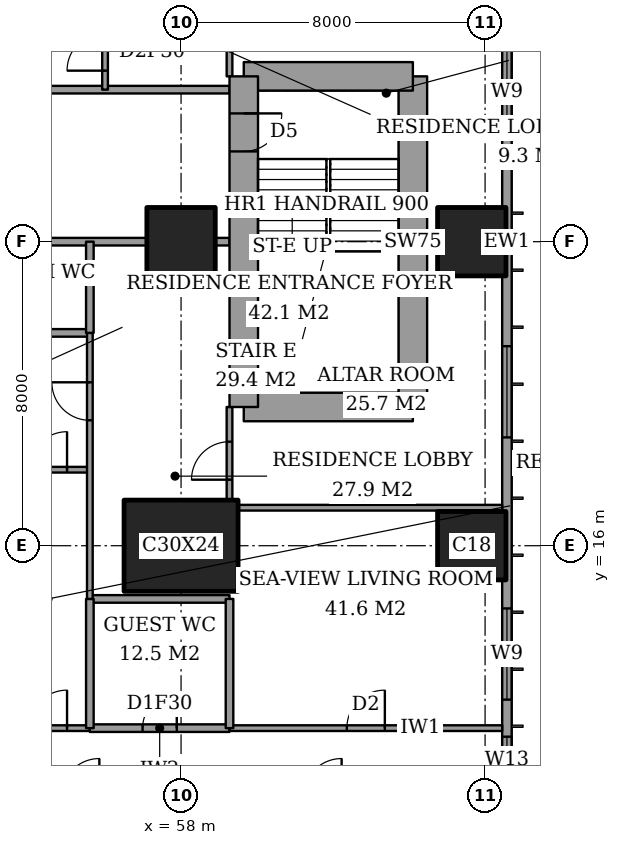
"""IFC4 building model, lengths in metres.
Left out: names, types, materials, properties, quantities, classifications, styles, units other than length and angle.
Written with IfcOpenShell. Run it as: python <this file> out.ifc"""

import sys

from ifc_helpers import new_model, si_unit, direction, frame, frame_2d, origin, origin_2d, place, context, subcontext, project, spatial, rectangle, extrude, element, fill, save


model = new_model("IFC4")
c1 = context("Model", 3, precision=1e-05, world=origin(), true_north=direction((0.0, 1.0)))
c2 = subcontext(c1, "Body", "Model", "MODEL_VIEW")
j1 = project(units=[si_unit("LENGTHUNIT", "METRE"), si_unit("PLANEANGLEUNIT", "RADIAN")], contexts=[c1])
p1 = place(None, origin())
s1 = spatial("IfcSite", under=j1, at=p1, CompositionType="ELEMENT")
p2 = place(p1, origin())
s2 = spatial("IfcBuilding", under=s1, at=p2, CompositionType="ELEMENT")
p3 = place(p2, frame((0.0, 0.0, 189.4)))
s3 = spatial("IfcBuildingStorey", under=s2, at=p3, CompositionType="ELEMENT", Elevation=189.4)
p4 = place(p3, frame((58.0, 16.0, 0.0), z_axis=(0.0, 0.0, 1.0), x_axis=(1.0, 0.0, 0.0)))
e1 = element("IfcColumn", 1, at=p4, inside=s3, PredefinedType="COLUMN", context=c2, shape_type="SweptSolid", body=[
    extrude(rectangle(XDim=3.0, YDim=2.4, at=origin_2d()), origin(), (0.0, 0.0, 1.0), 3.6),
])
for number, where, z_axis, x_axis in (
    (2, (58.0, 24.0, 0.0), (0.0, 0.0, 1.0), (1.0, 0.0, 0.0)),
    (3, (65.65, 16.0, 0.0), (0.0, 0.0, 1.0), (1.0, 0.0, 0.0)),
    (4, (65.65, 24.0, 0.0), (0.0, 0.0, 1.0), (1.0, 0.0, 0.0)),
):
    element("IfcColumn", number, at=place(p3, frame(where, z_axis=z_axis, x_axis=x_axis)), inside=s3, PredefinedType="COLUMN", context=c2, shape_type="SweptSolid", body=[
        extrude(rectangle(XDim=1.8, YDim=1.8, at=origin_2d()), origin(), (0.0, 0.0, 1.0), 3.6),
    ])
p5 = place(p3, frame((59.65, 19.65, 0.0), z_axis=(0.0, 0.0, 1.0), x_axis=(1.0, 0.0, 0.0)))
e5 = element("IfcWall", 5, at=p5, inside=s3, PredefinedType="SHEAR", context=c2, shape_type="SweptSolid", body=[
    extrude(rectangle(XDim=4.45, YDim=0.75, at=frame_2d((2.225, 0.0))), origin(), (0.0, 0.0, 1.0), 3.6),
])
p6 = place(p3, frame((64.1, 19.65, 0.0), z_axis=(0.0, 0.0, 1.0), x_axis=(0.0, 1.0, 0.0)))
e6 = element("IfcWall", 6, at=p6, inside=s3, PredefinedType="SHEAR", context=c2, shape_type="SweptSolid", body=[
    extrude(rectangle(XDim=8.7, YDim=0.75, at=frame_2d((4.35, 0.0))), origin(), (0.0, 0.0, 1.0), 3.6),
])
p7 = place(p3, frame((64.1, 28.35, 0.0), z_axis=(0.0, 0.0, 1.0), x_axis=(-1.0, 0.0, 0.0)))
e7 = element("IfcWall", 7, at=p7, inside=s3, PredefinedType="SHEAR", context=c2, shape_type="SweptSolid", body=[
    extrude(rectangle(XDim=4.45, YDim=0.75, at=frame_2d((2.225, 0.0))), origin(), (0.0, 0.0, 1.0), 3.6),
])
p8 = place(p3, frame((59.65, 28.35, 0.0), z_axis=(0.0, 0.0, 1.0), x_axis=(0.0, -1.0, 0.0)))
e8 = element("IfcWall", 8, at=p8, inside=s3, PredefinedType="SHEAR", context=c2, shape_type="SweptSolid", body=[
    extrude(rectangle(XDim=8.7, YDim=0.75, at=frame_2d((4.35, 0.0))), origin(), (0.0, 0.0, 1.0), 3.6),
])
p9 = place(p8, frame((0.975, 0.0, 0.0)))
e9 = element("IfcOpeningElement", 9, at=p9, cuts=e8, PredefinedType="OPENING", context=c2, shape_type="SweptSolid", body=[
    extrude(rectangle(XDim=1.0, YDim=2.1, at=frame_2d((0.5, 1.05))), frame((0.0, 0.385, 0.0), z_axis=(0.0, -1.0, 0.0), x_axis=(1.0, 0.0, 0.0)), (0.0, 0.0, 1.0), 0.77),
])
p10 = place(p3, frame((66.575, 3.175, 0.0), z_axis=(0.0, 0.0, 1.0), x_axis=(0.0, 1.0, 0.0)))
e10 = element("IfcWall", 10, at=p10, inside=s3, PredefinedType="SOLIDWALL", context=c2, shape_type="SweptSolid", body=[
    extrude(rectangle(XDim=41.65, YDim=0.25, at=frame_2d((20.825, 0.0))), origin(), (0.0, 0.0, 1.0), 3.6),
])
p11 = place(p10, frame((0.825, 0.0, 0.2)))
e11 = element("IfcOpeningElement", 11, at=p11, cuts=e10, PredefinedType="OPENING", context=c2, shape_type="SweptSolid", body=[
    extrude(rectangle(XDim=2.4, YDim=2.4, at=frame_2d((1.2, 1.2))), frame((0.0, 0.135, 0.0), z_axis=(0.0, -1.0, 0.0), x_axis=(1.0, 0.0, 0.0)), (0.0, 0.0, 1.0), 0.27),
])
p12 = place(p10, frame((6.6, 0.0, 0.2)))
e12 = element("IfcOpeningElement", 12, at=p12, cuts=e10, PredefinedType="OPENING", context=c2, shape_type="SweptSolid", body=[
    extrude(rectangle(XDim=1.2, YDim=2.4, at=frame_2d((0.6, 1.2))), frame((0.0, 0.135, 0.0), z_axis=(0.0, -1.0, 0.0), x_axis=(1.0, 0.0, 0.0)), (0.0, 0.0, 1.0), 0.27),
])
p13 = place(p10, frame((8.775, 0.0, 0.2)))
e13 = element("IfcOpeningElement", 13, at=p13, cuts=e10, PredefinedType="OPENING", context=c2, shape_type="SweptSolid", body=[
    extrude(rectangle(XDim=2.4, YDim=2.4, at=frame_2d((1.2, 1.2))), frame((0.0, 0.135, 0.0), z_axis=(0.0, -1.0, 0.0), x_axis=(1.0, 0.0, 0.0)), (0.0, 0.0, 1.0), 0.27),
])
p14 = place(p10, frame((15.675, 0.0, 0.2)))
e14 = element("IfcOpeningElement", 14, at=p14, cuts=e10, PredefinedType="OPENING", context=c2, shape_type="SweptSolid", body=[
    extrude(rectangle(XDim=2.4, YDim=2.4, at=frame_2d((1.2, 1.2))), frame((0.0, 0.135, 0.0), z_axis=(0.0, -1.0, 0.0), x_axis=(1.0, 0.0, 0.0)), (0.0, 0.0, 1.0), 0.27),
])
p15 = place(p10, frame((23.575, 0.0, 0.2)))
e15 = element("IfcOpeningElement", 15, at=p15, cuts=e10, PredefinedType="OPENING", context=c2, shape_type="SweptSolid", body=[
    extrude(rectangle(XDim=2.4, YDim=2.4, at=frame_2d((1.2, 1.2))), frame((0.0, 0.135, 0.0), z_axis=(0.0, -1.0, 0.0), x_axis=(1.0, 0.0, 0.0)), (0.0, 0.0, 1.0), 0.27),
])
p16 = place(p10, frame((30.775, 0.0, 0.2)))
e16 = element("IfcOpeningElement", 16, at=p16, cuts=e10, PredefinedType="OPENING", context=c2, shape_type="SweptSolid", body=[
    extrude(rectangle(XDim=2.4, YDim=2.4, at=frame_2d((1.2, 1.2))), frame((0.0, 0.135, 0.0), z_axis=(0.0, -1.0, 0.0), x_axis=(1.0, 0.0, 0.0)), (0.0, 0.0, 1.0), 0.27),
])
p17 = place(p10, frame((34.55, 0.0, 0.2)))
e17 = element("IfcOpeningElement", 17, at=p17, cuts=e10, PredefinedType="OPENING", context=c2, shape_type="SweptSolid", body=[
    extrude(rectangle(XDim=1.2, YDim=2.4, at=frame_2d((0.6, 1.2))), frame((0.0, 0.135, 0.0), z_axis=(0.0, -1.0, 0.0), x_axis=(1.0, 0.0, 0.0)), (0.0, 0.0, 1.0), 0.27),
])
p18 = place(p10, frame((38.425, 0.0, 0.2)))
e18 = element("IfcOpeningElement", 18, at=p18, cuts=e10, PredefinedType="OPENING", context=c2, shape_type="SweptSolid", body=[
    extrude(rectangle(XDim=2.4, YDim=2.4, at=frame_2d((1.2, 1.2))), frame((0.0, 0.135, 0.0), z_axis=(0.0, -1.0, 0.0), x_axis=(1.0, 0.0, 0.0)), (0.0, 0.0, 1.0), 0.27),
])
p19 = place(p3, frame((55.6, 11.2, 0.0), z_axis=(0.0, 0.0, 1.0), x_axis=(1.0, 0.0, 0.0)))
e19 = element("IfcWall", 19, at=p19, inside=s3, PredefinedType="PARTITIONING", context=c2, shape_type="SweptSolid", body=[
    extrude(rectangle(XDim=3.675, YDim=0.2, at=frame_2d((1.837, 0.0))), origin(), (0.0, 0.0, 1.0), 3.35),
])
p20 = place(p19, frame((1.387, 0.0, 0.0)))
e20 = element("IfcOpeningElement", 20, at=p20, cuts=e19, PredefinedType="OPENING", context=c2, shape_type="SweptSolid", body=[
    extrude(rectangle(XDim=0.9, YDim=2.1, at=frame_2d((0.45, 1.05))), frame((0.0, 0.11, 0.0), z_axis=(0.0, -1.0, 0.0), x_axis=(1.0, 0.0, 0.0)), (0.0, 0.0, 1.0), 0.22),
])
p21 = place(p3, frame((41.439, 11.2, 0.0), z_axis=(0.0, 0.0, 1.0), x_axis=(1.0, 0.0, 0.0)))
e21 = element("IfcWall", 21, at=p21, inside=s3, PredefinedType="PARTITIONING", context=c2, shape_type="SweptSolid", body=[
    extrude(rectangle(XDim=14.161, YDim=0.15, at=frame_2d((7.081, 0.0))), origin(), (0.0, 0.0, 1.0), 3.35),
])
p22 = place(p21, frame((12.561, 0.0, 0.0)))
e22 = element("IfcOpeningElement", 22, at=p22, cuts=e21, PredefinedType="OPENING", context=c2, shape_type="SweptSolid", body=[
    extrude(rectangle(XDim=1.0, YDim=2.1, at=frame_2d((0.5, 1.05))), frame((0.0, 0.085, 0.0), z_axis=(0.0, -1.0, 0.0), x_axis=(1.0, 0.0, 0.0)), (0.0, 0.0, 1.0), 0.17),
])
p23 = place(p21, frame((10.061, 0.0, 0.0)))
e23 = element("IfcOpeningElement", 23, at=p23, cuts=e21, PredefinedType="OPENING", context=c2, shape_type="SweptSolid", body=[
    extrude(rectangle(XDim=1.0, YDim=2.1, at=frame_2d((0.5, 1.05))), frame((0.0, 0.085, 0.0), z_axis=(0.0, -1.0, 0.0), x_axis=(1.0, 0.0, 0.0)), (0.0, 0.0, 1.0), 0.17),
])
p24 = place(p21, frame((7.361, 0.0, 0.0)))
e24 = element("IfcOpeningElement", 24, at=p24, cuts=e21, PredefinedType="OPENING", context=c2, shape_type="SweptSolid", body=[
    extrude(rectangle(XDim=1.0, YDim=2.1, at=frame_2d((0.5, 1.05))), frame((0.0, 0.085, 0.0), z_axis=(0.0, -1.0, 0.0), x_axis=(1.0, 0.0, 0.0)), (0.0, 0.0, 1.0), 0.17),
])
p25 = place(p21, frame((2.836, 0.0, 0.0)))
e25 = element("IfcOpeningElement", 25, at=p25, cuts=e21, PredefinedType="OPENING", context=c2, shape_type="SweptSolid", body=[
    extrude(rectangle(XDim=1.0, YDim=2.1, at=frame_2d((0.5, 1.05))), frame((0.0, 0.085, 0.0), z_axis=(0.0, -1.0, 0.0), x_axis=(1.0, 0.0, 0.0)), (0.0, 0.0, 1.0), 0.17),
])
p26 = place(p3, frame((59.275, 11.2, 0.0), z_axis=(0.0, 0.0, 1.0), x_axis=(1.0, 0.0, 0.0)))
e26 = element("IfcWall", 26, at=p26, inside=s3, PredefinedType="PARTITIONING", context=c2, shape_type="SweptSolid", body=[
    extrude(rectangle(XDim=7.175, YDim=0.15, at=frame_2d((3.587, 0.0))), origin(), (0.0, 0.0, 1.0), 3.35),
])
p27 = place(p26, frame((3.087, 0.0, 0.0)))
e27 = element("IfcOpeningElement", 27, at=p27, cuts=e26, PredefinedType="OPENING", context=c2, shape_type="SweptSolid", body=[
    extrude(rectangle(XDim=1.0, YDim=2.1, at=frame_2d((0.5, 1.05))), frame((0.0, 0.085, 0.0), z_axis=(0.0, -1.0, 0.0), x_axis=(1.0, 0.0, 0.0)), (0.0, 0.0, 1.0), 0.17),
])
p28 = place(p3, frame((55.6, 14.6, 0.0), z_axis=(0.0, 0.0, 1.0), x_axis=(1.0, 0.0, 0.0)))
e28 = element("IfcWall", 28, at=p28, inside=s3, PredefinedType="PARTITIONING", context=c2, shape_type="SweptSolid", body=[
    extrude(rectangle(XDim=3.675, YDim=0.2, at=frame_2d((1.837, 0.0))), origin(), (0.0, 0.0, 1.0), 3.35),
])
p29 = place(p3, frame((59.5, 17.0, 0.0), z_axis=(0.0, 0.0, 1.0), x_axis=(1.0, 0.0, 0.0)))
e29 = element("IfcWall", 29, at=p29, inside=s3, PredefinedType="PARTITIONING", context=c2, shape_type="SweptSolid", body=[
    extrude(rectangle(XDim=6.95, YDim=0.15, at=frame_2d((3.475, 0.0))), origin(), (0.0, 0.0, 1.0), 3.35),
])
p30 = place(p3, frame((51.6, 18.0, 0.0), z_axis=(0.0, 0.0, 1.0), x_axis=(1.0, 0.0, 0.0)))
e30 = element("IfcWall", 30, at=p30, inside=s3, PredefinedType="PARTITIONING", context=c2, shape_type="SweptSolid", body=[
    extrude(rectangle(XDim=4.0, YDim=0.15, at=frame_2d((2.0, 0.0))), origin(), (0.0, 0.0, 1.0), 3.35),
])
p31 = place(p30, frame((2.4, 0.0, 0.0)))
e31 = element("IfcOpeningElement", 31, at=p31, cuts=e30, PredefinedType="OPENING", context=c2, shape_type="SweptSolid", body=[
    extrude(rectangle(XDim=1.0, YDim=2.1, at=frame_2d((0.5, 1.05))), frame((0.0, 0.085, 0.0), z_axis=(0.0, -1.0, 0.0), x_axis=(1.0, 0.0, 0.0)), (0.0, 0.0, 1.0), 0.17),
])
p32 = place(p3, frame((51.2, 21.6, 0.0), z_axis=(0.0, 0.0, 1.0), x_axis=(1.0, 0.0, 0.0)))
e32 = element("IfcWall", 32, at=p32, inside=s3, PredefinedType="PARTITIONING", context=c2, shape_type="SweptSolid", body=[
    extrude(rectangle(XDim=4.4, YDim=0.2, at=frame_2d((2.2, 0.0))), origin(), (0.0, 0.0, 1.0), 3.35),
])
p33 = place(p32, frame((1.75, 0.0, 0.0)))
e33 = element("IfcOpeningElement", 33, at=p33, cuts=e32, PredefinedType="OPENING", context=c2, shape_type="SweptSolid", body=[
    extrude(rectangle(XDim=0.9, YDim=2.1, at=frame_2d((0.45, 1.05))), frame((0.0, 0.11, 0.0), z_axis=(0.0, -1.0, 0.0), x_axis=(1.0, 0.0, 0.0)), (0.0, 0.0, 1.0), 0.22),
])
p34 = place(p3, frame((50.9, 24.0, 0.0), z_axis=(0.0, 0.0, 1.0), x_axis=(1.0, 0.0, 0.0)))
e34 = element("IfcWall", 34, at=p34, inside=s3, PredefinedType="PARTITIONING", context=c2, shape_type="SweptSolid", body=[
    extrude(rectangle(XDim=6.2, YDim=0.2, at=frame_2d((3.1, 0.0))), origin(), (0.0, 0.0, 1.0), 3.35),
])
p35 = place(p3, frame((58.9, 24.0, 0.0), z_axis=(0.0, 0.0, 1.0), x_axis=(1.0, 0.0, 0.0)))
e35 = element("IfcWall", 35, at=p35, inside=s3, PredefinedType="PARTITIONING", context=c2, shape_type="SweptSolid", body=[
    extrude(rectangle(XDim=0.375, YDim=0.2, at=frame_2d((0.188, 0.0))), origin(), (0.0, 0.0, 1.0), 3.35),
])
p36 = place(p3, frame((42.0, 28.0, 0.0), z_axis=(0.0, 0.0, 1.0), x_axis=(1.0, 0.0, 0.0)))
e36 = element("IfcWall", 36, at=p36, inside=s3, PredefinedType="PARTITIONING", context=c2, shape_type="SweptSolid", body=[
    extrude(rectangle(XDim=17.275, YDim=0.2, at=frame_2d((8.637, 0.0))), origin(), (0.0, 0.0, 1.0), 3.35),
])
p37 = place(p36, frame((9.4, 0.0, 0.0)))
e37 = element("IfcOpeningElement", 37, at=p37, cuts=e36, PredefinedType="OPENING", context=c2, shape_type="SweptSolid", body=[
    extrude(rectangle(XDim=1.2, YDim=2.4, at=frame_2d((0.6, 1.2))), frame((0.0, 0.11, 0.0), z_axis=(0.0, -1.0, 0.0), x_axis=(1.0, 0.0, 0.0)), (0.0, 0.0, 1.0), 0.22),
])
p38 = place(p3, frame((55.6, 11.2, 0.0), z_axis=(0.0, 0.0, 1.0), x_axis=(0.0, 1.0, 0.0)))
e38 = element("IfcWall", 38, at=p38, inside=s3, PredefinedType="PARTITIONING", context=c2, shape_type="SweptSolid", body=[
    extrude(rectangle(XDim=3.4, YDim=0.2, at=frame_2d((1.7, 0.0))), origin(), (0.0, 0.0, 1.0), 3.35),
])
p39 = place(p3, frame((55.6, 21.6, 0.0), z_axis=(0.0, 0.0, 1.0), x_axis=(0.0, 1.0, 0.0)))
e39 = element("IfcWall", 39, at=p39, inside=s3, PredefinedType="PARTITIONING", context=c2, shape_type="SweptSolid", body=[
    extrude(rectangle(XDim=2.4, YDim=0.2, at=frame_2d((1.2, 0.0))), origin(), (0.0, 0.0, 1.0), 3.35),
])
p40 = place(p3, frame((55.6, 14.6, 0.0), z_axis=(0.0, 0.0, 1.0), x_axis=(0.0, 1.0, 0.0)))
e40 = element("IfcWall", 40, at=p40, inside=s3, PredefinedType="PARTITIONING", context=c2, shape_type="SweptSolid", body=[
    extrude(rectangle(XDim=7.0, YDim=0.15, at=frame_2d((3.5, 0.0))), origin(), (0.0, 0.0, 1.0), 3.35),
])
p41 = place(p40, frame((4.7, 0.0, 0.0)))
e41 = element("IfcOpeningElement", 41, at=p41, cuts=e40, PredefinedType="OPENING", context=c2, shape_type="SweptSolid", body=[
    extrude(rectangle(XDim=1.0, YDim=2.1, at=frame_2d((0.5, 1.05))), frame((0.0, 0.085, 0.0), z_axis=(0.0, -1.0, 0.0), x_axis=(1.0, 0.0, 0.0)), (0.0, 0.0, 1.0), 0.17),
])
p42 = place(p3, frame((56.0, 28.0, 0.0), z_axis=(0.0, 0.0, 1.0), x_axis=(0.0, 1.0, 0.0)))
e42 = element("IfcWall", 42, at=p42, inside=s3, PredefinedType="PARTITIONING", context=c2, shape_type="SweptSolid", body=[
    extrude(rectangle(XDim=9.4, YDim=0.15, at=frame_2d((4.7, 0.0))), origin(), (0.0, 0.0, 1.0), 3.35),
])
p43 = place(p42, frame((0.5, 0.0, 0.0)))
e43 = element("IfcOpeningElement", 43, at=p43, cuts=e42, PredefinedType="OPENING", context=c2, shape_type="SweptSolid", body=[
    extrude(rectangle(XDim=1.0, YDim=2.1, at=frame_2d((0.5, 1.05))), frame((0.0, 0.085, 0.0), z_axis=(0.0, -1.0, 0.0), x_axis=(1.0, 0.0, 0.0)), (0.0, 0.0, 1.0), 0.17),
])
p44 = place(p3, frame((59.275, 11.2, 0.0), z_axis=(0.0, 0.0, 1.0), x_axis=(0.0, 1.0, 0.0)))
e44 = element("IfcWall", 44, at=p44, inside=s3, PredefinedType="PARTITIONING", context=c2, shape_type="SweptSolid", body=[
    extrude(rectangle(XDim=3.4, YDim=0.2, at=frame_2d((1.7, 0.0))), origin(), (0.0, 0.0, 1.0), 3.35),
])
p45 = place(p3, frame((59.275, 17.2, 0.0), z_axis=(0.0, 0.0, 1.0), x_axis=(0.0, 1.0, 0.0)))
e45 = element("IfcWall", 45, at=p45, inside=s3, PredefinedType="PARTITIONING", context=c2, shape_type="SweptSolid", body=[
    extrude(rectangle(XDim=2.45, YDim=0.15, at=frame_2d((1.225, 0.0))), origin(), (0.0, 0.0, 1.0), 3.35),
])
p46 = place(p45, frame((0.538, 0.0, 0.0)))
e46 = element("IfcOpeningElement", 46, at=p46, cuts=e45, PredefinedType="OPENING", context=c2, shape_type="SweptSolid", body=[
    extrude(rectangle(XDim=1.0, YDim=2.1, at=frame_2d((0.5, 1.05))), frame((0.0, 0.085, 0.0), z_axis=(0.0, -1.0, 0.0), x_axis=(1.0, 0.0, 0.0)), (0.0, 0.0, 1.0), 0.17),
])
p47 = place(p3, frame((59.275, 28.35, 0.0), z_axis=(0.0, 0.0, 1.0), x_axis=(0.0, 1.0, 0.0)))
e47 = element("IfcWall", 47, at=p47, inside=s3, PredefinedType="PARTITIONING", context=c2, shape_type="SweptSolid", body=[
    extrude(rectangle(XDim=2.45, YDim=0.15, at=frame_2d((1.225, 0.0))), origin(), (0.0, 0.0, 1.0), 3.35),
])
p48 = place(p47, frame((0.962, 0.0, 0.0)))
e48 = element("IfcOpeningElement", 48, at=p48, cuts=e47, PredefinedType="OPENING", context=c2, shape_type="SweptSolid", body=[
    extrude(rectangle(XDim=0.9, YDim=2.1, at=frame_2d((0.45, 1.05))), frame((0.0, 0.085, 0.0), z_axis=(0.0, -1.0, 0.0), x_axis=(1.0, 0.0, 0.0)), (0.0, 0.0, 1.0), 0.17),
])
p49 = place(p12, origin())
e49 = element("IfcWindow", 49, at=p49, inside=s3, PartitioningType="SINGLE_PANEL", PredefinedType="WINDOW", context=c2, shape_type="SweptSolid", body=[
    extrude(rectangle(XDim=1.2, YDim=2.4, at=frame_2d((0.6, 1.2))), frame((0.0, 0.03, 0.0), z_axis=(0.0, -1.0, 0.0), x_axis=(1.0, 0.0, 0.0)), (0.0, 0.0, 1.0), 0.06),
])
fill(e12, e49)
p50 = place(p13, origin())
e50 = element("IfcWindow", 50, at=p50, inside=s3, PartitioningType="SINGLE_PANEL", PredefinedType="WINDOW", context=c2, shape_type="SweptSolid", body=[
    extrude(rectangle(XDim=2.4, YDim=2.4, at=frame_2d((1.2, 1.2))), frame((0.0, 0.03, 0.0), z_axis=(0.0, -1.0, 0.0), x_axis=(1.0, 0.0, 0.0)), (0.0, 0.0, 1.0), 0.06),
])
fill(e13, e50)
p51 = place(p14, origin())
e51 = element("IfcWindow", 51, at=p51, inside=s3, PartitioningType="SINGLE_PANEL", PredefinedType="WINDOW", context=c2, shape_type="SweptSolid", body=[
    extrude(rectangle(XDim=2.4, YDim=2.4, at=frame_2d((1.2, 1.2))), frame((0.0, 0.03, 0.0), z_axis=(0.0, -1.0, 0.0), x_axis=(1.0, 0.0, 0.0)), (0.0, 0.0, 1.0), 0.06),
])
fill(e14, e51)
p52 = place(p15, origin())
e52 = element("IfcWindow", 52, at=p52, inside=s3, PartitioningType="SINGLE_PANEL", PredefinedType="WINDOW", context=c2, shape_type="SweptSolid", body=[
    extrude(rectangle(XDim=2.4, YDim=2.4, at=frame_2d((1.2, 1.2))), frame((0.0, 0.03, 0.0), z_axis=(0.0, -1.0, 0.0), x_axis=(1.0, 0.0, 0.0)), (0.0, 0.0, 1.0), 0.06),
])
fill(e15, e52)
p53 = place(p22, origin())
e53 = element("IfcDoor", 53, at=p53, inside=s3, OperationType="SINGLE_SWING_LEFT", PredefinedType="DOOR", context=c2, shape_type="SweptSolid", body=[
    extrude(rectangle(XDim=1.0, YDim=2.1, at=frame_2d((0.5, 1.05))), frame((0.0, 0.025, 0.0), z_axis=(0.0, -1.0, 0.0), x_axis=(1.0, 0.0, 0.0)), (0.0, 0.0, 1.0), 0.05),
])
fill(e22, e53)
p54 = place(p27, origin())
e54 = element("IfcDoor", 54, at=p54, inside=s3, OperationType="SINGLE_SWING_LEFT", PredefinedType="DOOR", context=c2, shape_type="SweptSolid", body=[
    extrude(rectangle(XDim=1.0, YDim=2.1, at=frame_2d((0.5, 1.05))), frame((0.0, 0.025, 0.0), z_axis=(0.0, -1.0, 0.0), x_axis=(1.0, 0.0, 0.0)), (0.0, 0.0, 1.0), 0.05),
])
fill(e27, e54)
p55 = place(p46, origin())
e55 = element("IfcDoor", 55, at=p55, inside=s3, OperationType="SINGLE_SWING_RIGHT", PredefinedType="DOOR", context=c2, shape_type="SweptSolid", body=[
    extrude(rectangle(XDim=1.0, YDim=2.1, at=frame_2d((0.5, 1.05))), frame((0.0, 0.025, 0.0), z_axis=(0.0, -1.0, 0.0), x_axis=(1.0, 0.0, 0.0)), (0.0, 0.0, 1.0), 0.05),
])
fill(e46, e55)
p56 = place(p20, origin())
e56 = element("IfcDoor", 56, at=p56, inside=s3, OperationType="SINGLE_SWING_LEFT", PredefinedType="DOOR", context=c2, shape_type="SweptSolid", body=[
    extrude(rectangle(XDim=0.9, YDim=2.1, at=frame_2d((0.45, 1.05))), frame((0.0, 0.025, 0.0), z_axis=(0.0, -1.0, 0.0), x_axis=(1.0, 0.0, 0.0)), (0.0, 0.0, 1.0), 0.05),
])
fill(e20, e56)
p57 = place(p41, origin())
e57 = element("IfcDoor", 57, at=p57, inside=s3, OperationType="SINGLE_SWING_LEFT", PredefinedType="DOOR", context=c2, shape_type="SweptSolid", body=[
    extrude(rectangle(XDim=1.0, YDim=2.1, at=frame_2d((0.5, 1.05))), frame((0.0, 0.025, 0.0), z_axis=(0.0, -1.0, 0.0), x_axis=(1.0, 0.0, 0.0)), (0.0, 0.0, 1.0), 0.05),
])
fill(e41, e57)
p58 = place(p31, origin())
e58 = element("IfcDoor", 58, at=p58, inside=s3, OperationType="SINGLE_SWING_LEFT", PredefinedType="DOOR", context=c2, shape_type="SweptSolid", body=[
    extrude(rectangle(XDim=1.0, YDim=2.1, at=frame_2d((0.5, 1.05))), frame((0.0, 0.025, 0.0), z_axis=(0.0, -1.0, 0.0), x_axis=(1.0, 0.0, 0.0)), (0.0, 0.0, 1.0), 0.05),
])
fill(e31, e58)
p59 = place(p43, origin())
e59 = element("IfcDoor", 59, at=p59, inside=s3, OperationType="SINGLE_SWING_RIGHT", PredefinedType="DOOR", context=c2, shape_type="SweptSolid", body=[
    extrude(rectangle(XDim=1.0, YDim=2.1, at=frame_2d((0.5, 1.05))), frame((0.0, 0.025, 0.0), z_axis=(0.0, -1.0, 0.0), x_axis=(1.0, 0.0, 0.0)), (0.0, 0.0, 1.0), 0.05),
])
fill(e43, e59)
p60 = place(p9, origin())
e60 = element("IfcDoor", 60, at=p60, inside=s3, OperationType="SINGLE_SWING_RIGHT", PredefinedType="DOOR", context=c2, shape_type="SweptSolid", body=[
    extrude(rectangle(XDim=1.0, YDim=2.1, at=frame_2d((0.5, 1.05))), frame((0.0, 0.025, 0.0), z_axis=(0.0, -1.0, 0.0), x_axis=(1.0, 0.0, 0.0)), (0.0, 0.0, 1.0), 0.05),
])
fill(e9, e60)
save(model, sys.argv[1])
